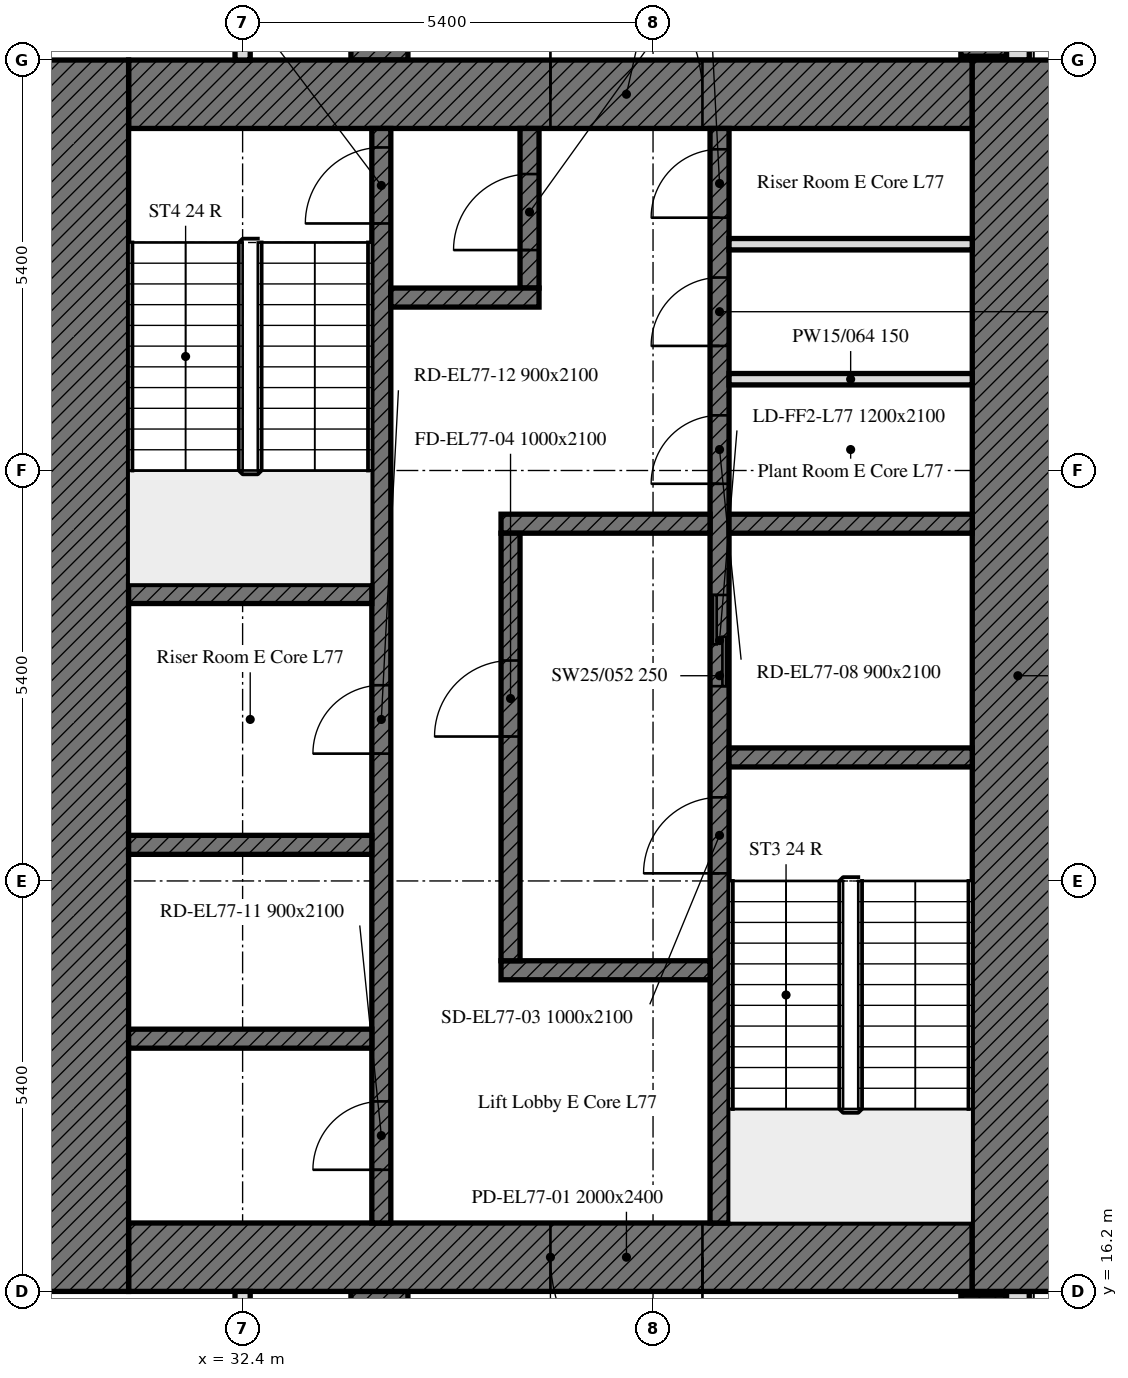
"""IFC4 building model, lengths in metres.
Left out: names, types, materials, properties, quantities, classifications, styles, units other than length and angle.
Written with IfcOpenShell. Run it as: python <this file> out.ifc"""

import sys

from ifc_helpers import new_model, si_unit, direction, frame, frame_2d, origin, place, context, subcontext, project, spatial, polyline, rectangle, outline, extrude, element, fill, save


model = new_model("IFC4")
c1 = context("Model", 3, precision=1e-05, world=origin(), true_north=direction((0.0, 1.0)))
c2 = subcontext(c1, "Body", "Model", "MODEL_VIEW")
j1 = project(units=[si_unit("LENGTHUNIT", "METRE"), si_unit("PLANEANGLEUNIT", "RADIAN")], contexts=[c1])
p1 = place(None, origin())
s1 = spatial("IfcSite", under=j1, at=p1, CompositionType="ELEMENT")
p2 = place(p1, origin())
s2 = spatial("IfcBuilding", under=s1, at=p2, CompositionType="ELEMENT")
p3 = place(p2, frame((0.0, 0.0, 308.2)))
s3 = spatial("IfcBuildingStorey", under=s2, at=p3, CompositionType="ELEMENT", Elevation=308.2)
p4 = place(p3, frame((42.15, 36.45, 0.0), z_axis=(0.0, 0.0, 1.0), x_axis=(0.0, -1.0, 0.0)))
e1 = element("IfcWall", 1, at=p4, inside=s3, PredefinedType="SHEAR", context=c2, shape_type="SweptSolid", body=[
    extrude(rectangle(XDim=4.0, YDim=0.6, at=frame_2d((2.0, 0.0))), origin(), (0.0, 0.0, 1.0), 4.2),
])
p5 = place(p3, frame((42.15, 16.15, 0.0), z_axis=(0.0, 0.0, 1.0), x_axis=(0.0, -1.0, 0.0)))
e2 = element("IfcWall", 2, at=p5, inside=s3, PredefinedType="SHEAR", context=c2, shape_type="SweptSolid", body=[
    extrude(rectangle(XDim=4.915, YDim=0.6, at=frame_2d((2.458, 0.0))), origin(), (0.0, 0.0, 1.0), 4.2),
])
p6 = place(p3, frame((34.2, 12.05, 0.0), z_axis=(0.0, 0.0, 1.0), x_axis=(0.0, 1.0, 0.0)))
e3 = element("IfcWall", 3, at=p6, inside=s3, PredefinedType="SHEAR", context=c2, shape_type="SweptSolid", body=[
    extrude(rectangle(XDim=4.15, YDim=0.75, at=frame_2d((2.075, 0.0))), origin(), (0.0, 0.0, 1.0), 4.2),
])
p7 = place(p3, frame((34.2, 32.4, 0.0), z_axis=(0.0, 0.0, 1.0), x_axis=(0.0, 1.0, 0.0)))
e4 = element("IfcWall", 4, at=p7, inside=s3, PredefinedType="SHEAR", context=c2, shape_type="SweptSolid", body=[
    extrude(rectangle(XDim=4.15, YDim=0.75, at=frame_2d((2.075, 0.0))), origin(), (0.0, 0.0, 1.0), 4.2),
])
p8 = place(p3, frame((42.6, 10.986, 0.0), z_axis=(0.0, 0.0, 1.0), x_axis=(0.0, 1.0, 0.0)))
e5 = element("IfcWall", 5, at=p8, inside=s3, PredefinedType="SOLIDWALL", context=c2, shape_type="SweptSolid", body=[
    extrude(outline(polyline([(0.0, 0.0), (5.214, 0.0), (5.214, 4.2), (4.634, 4.2), (4.055, 4.2), (3.476, 4.2), (2.896, 4.2), (2.317, 4.2), (1.738, 4.2), (1.159, 4.2), (0.579, 4.2), (0.0, 4.2), (0.0, 0.0)])), frame((0.0, 0.15, 0.0), z_axis=(0.0, -1.0, 0.0), x_axis=(1.0, 0.0, 0.0)), (0.0, 0.0, 1.0), 0.3),
])
p9 = place(p8, frame((1.014, 0.0, 0.6)))
e6 = element("IfcOpeningElement", 6, at=p9, cuts=e5, PredefinedType="OPENING", context=c2, shape_type="SweptSolid", body=[
    extrude(rectangle(XDim=3.0, YDim=1.8, at=frame_2d((1.5, 0.9))), frame((0.0, 0.16, 0.0), z_axis=(0.0, -1.0, 0.0), x_axis=(1.0, 0.0, 0.0)), (0.0, 0.0, 1.0), 0.32),
])
p10 = place(p3, frame((42.6, 32.4, 0.0), z_axis=(0.0, 0.0, 1.0), x_axis=(0.0, 1.0, 0.0)))
e7 = element("IfcWall", 7, at=p10, inside=s3, PredefinedType="SOLIDWALL", context=c2, shape_type="SweptSolid", body=[
    extrude(outline(polyline([(0.0, 0.0), (10.614, 0.0), (10.614, 4.2), (10.024, 4.2), (9.434, 4.2), (8.845, 4.2), (8.255, 4.2), (7.665, 4.2), (7.076, 4.2), (6.486, 4.2), (5.896, 4.2), (5.307, 4.2), (4.717, 4.2), (4.127, 4.2), (3.538, 4.2), (2.948, 4.2), (2.359, 4.2), (1.769, 4.2), (1.179, 4.2), (0.59, 4.2), (0.0, 4.2), (0.0, 0.0)])), frame((0.0, 0.15, 0.0), z_axis=(0.0, -1.0, 0.0), x_axis=(1.0, 0.0, 0.0)), (0.0, 0.0, 1.0), 0.3),
])
p11 = place(p10, frame((1.2, 0.0, 0.6)))
e8 = element("IfcOpeningElement", 8, at=p11, cuts=e7, PredefinedType="OPENING", context=c2, shape_type="SweptSolid", body=[
    extrude(rectangle(XDim=3.0, YDim=1.8, at=frame_2d((1.5, 0.9))), frame((0.0, 0.16, 0.0), z_axis=(0.0, -1.0, 0.0), x_axis=(1.0, 0.0, 0.0)), (0.0, 0.0, 1.0), 0.32),
])
p12 = place(p10, frame((6.6, 0.0, 0.6)))
e9 = element("IfcOpeningElement", 9, at=p12, cuts=e7, PredefinedType="OPENING", context=c2, shape_type="SweptSolid", body=[
    extrude(rectangle(XDim=3.0, YDim=1.8, at=frame_2d((1.5, 0.9))), frame((0.0, 0.16, 0.0), z_axis=(0.0, -1.0, 0.0), x_axis=(1.0, 0.0, 0.0)), (0.0, 0.0, 1.0), 0.32),
])
p13 = place(p3, frame((42.0, 16.65, 0.0), z_axis=(0.0, 0.0, 1.0), x_axis=(-1.0, 0.0, 0.0)))
e10 = element("IfcWall", 10, at=p13, inside=s3, PredefinedType="SOLIDWALL", context=c2, shape_type="SweptSolid", body=[
    extrude(rectangle(XDim=11.1, YDim=0.9, at=frame_2d((5.55, 0.0))), origin(), (0.0, 0.0, 1.0), 4.2),
])
p14 = place(p13, frame((3.55, 0.0, 0.0)))
e11 = element("IfcOpeningElement", 11, at=p14, cuts=e10, PredefinedType="OPENING", context=c2, shape_type="SweptSolid", body=[
    extrude(rectangle(XDim=2.0, YDim=2.4, at=frame_2d((1.0, 1.2))), frame((0.0, 0.45, 0.0), z_axis=(0.0, -1.0, 0.0), x_axis=(1.0, 0.0, 0.0)), (0.0, 0.0, 1.0), 0.9),
])
p15 = place(p3, frame((30.9, 31.95, 0.0), z_axis=(0.0, 0.0, 1.0), x_axis=(1.0, 0.0, 0.0)))
e12 = element("IfcWall", 12, at=p15, inside=s3, PredefinedType="SOLIDWALL", context=c2, shape_type="SweptSolid", body=[
    extrude(rectangle(XDim=11.1, YDim=0.9, at=frame_2d((5.55, 0.0))), origin(), (0.0, 0.0, 1.0), 4.2),
])
p16 = place(p15, frame((5.55, 0.0, 0.0)))
e13 = element("IfcOpeningElement", 13, at=p16, cuts=e12, PredefinedType="OPENING", context=c2, shape_type="SweptSolid", body=[
    extrude(rectangle(XDim=2.0, YDim=2.4, at=frame_2d((1.0, 1.2))), frame((0.0, 0.45, 0.0), z_axis=(0.0, -1.0, 0.0), x_axis=(1.0, 0.0, 0.0)), (0.0, 0.0, 1.0), 0.9),
])
for number, where, z_axis, x_axis in (
    (14, (42.6, 32.4, 0.0), (0.0, 0.0, 1.0), (0.0, -1.0, 0.0)),
    (15, (30.3, 16.2, 0.0), (0.0, 0.0, 1.0), (0.0, 1.0, 0.0)),
):
    element("IfcWall", number, at=place(p3, frame(where, z_axis=z_axis, x_axis=x_axis)), inside=s3, PredefinedType="SOLIDWALL", context=c2, shape_type="SweptSolid", body=[
        extrude(rectangle(XDim=16.2, YDim=1.2, at=frame_2d((8.1, 0.0))), origin(), (0.0, 0.0, 1.0), 4.2),
    ])
p17 = place(p3, frame((38.675, 17.1, 0.0), z_axis=(0.0, 0.0, 1.0), x_axis=(0.0, 1.0, 0.0)))
e16 = element("IfcWall", 16, at=p17, inside=s3, PredefinedType="SOLIDWALL", context=c2, shape_type="SweptSolid", body=[
    extrude(rectangle(XDim=14.4, YDim=0.25, at=frame_2d((7.2, 0.0))), origin(), (0.0, 0.0, 1.0), 4.2),
])
p18 = place(p17, frame((4.6, 0.0, 0.0)))
e17 = element("IfcOpeningElement", 17, at=p18, cuts=e16, PredefinedType="OPENING", context=c2, shape_type="SweptSolid", body=[
    extrude(rectangle(XDim=1.0, YDim=2.1, at=frame_2d((0.5, 1.05))), frame((0.0, 0.125, 0.0), z_axis=(0.0, -1.0, 0.0), x_axis=(1.0, 0.0, 0.0)), (0.0, 0.0, 1.0), 0.25),
])
p19 = place(p17, frame((7.062, 0.0, 0.0)))
e18 = element("IfcOpeningElement", 18, at=p19, cuts=e16, PredefinedType="OPENING", context=c2, shape_type="SweptSolid", body=[
    extrude(rectangle(XDim=1.2, YDim=2.1, at=frame_2d((0.6, 1.05))), frame((0.0, 0.125, 0.0), z_axis=(0.0, -1.0, 0.0), x_axis=(1.0, 0.0, 0.0)), (0.0, 0.0, 1.0), 0.25),
])
p20 = place(p17, frame((9.726, 0.0, 0.0)))
e19 = element("IfcOpeningElement", 19, at=p20, cuts=e16, PredefinedType="OPENING", context=c2, shape_type="SweptSolid", body=[
    extrude(rectangle(XDim=0.9, YDim=2.1, at=frame_2d((0.45, 1.05))), frame((0.0, 0.125, 0.0), z_axis=(0.0, -1.0, 0.0), x_axis=(1.0, 0.0, 0.0)), (0.0, 0.0, 1.0), 0.25),
])
p21 = place(p17, frame((11.539, 0.0, 0.0)))
e20 = element("IfcOpeningElement", 20, at=p21, cuts=e16, PredefinedType="OPENING", context=c2, shape_type="SweptSolid", body=[
    extrude(rectangle(XDim=0.9, YDim=2.1, at=frame_2d((0.45, 1.05))), frame((0.0, 0.125, 0.0), z_axis=(0.0, -1.0, 0.0), x_axis=(1.0, 0.0, 0.0)), (0.0, 0.0, 1.0), 0.25),
])
p22 = place(p17, frame((13.226, 0.0, 0.0)))
e21 = element("IfcOpeningElement", 21, at=p22, cuts=e16, PredefinedType="OPENING", context=c2, shape_type="SweptSolid", body=[
    extrude(rectangle(XDim=0.9, YDim=2.1, at=frame_2d((0.45, 1.05))), frame((0.0, 0.125, 0.0), z_axis=(0.0, -1.0, 0.0), x_axis=(1.0, 0.0, 0.0)), (0.0, 0.0, 1.0), 0.25),
])
p23 = place(p3, frame((34.225, 17.1, 0.0), z_axis=(0.0, 0.0, 1.0), x_axis=(0.0, 1.0, 0.0)))
e22 = element("IfcWall", 22, at=p23, inside=s3, PredefinedType="SOLIDWALL", context=c2, shape_type="SweptSolid", body=[
    extrude(rectangle(XDim=14.4, YDim=0.25, at=frame_2d((7.2, 0.0))), origin(), (0.0, 0.0, 1.0), 4.2),
])
p24 = place(p23, frame((13.15, 0.0, 0.0)))
e23 = element("IfcOpeningElement", 23, at=p24, cuts=e22, PredefinedType="OPENING", context=c2, shape_type="SweptSolid", body=[
    extrude(rectangle(XDim=1.0, YDim=2.1, at=frame_2d((0.5, 1.05))), frame((0.0, 0.125, 0.0), z_axis=(0.0, -1.0, 0.0), x_axis=(1.0, 0.0, 0.0)), (0.0, 0.0, 1.0), 0.25),
])
p25 = place(p23, frame((0.7, 0.0, 0.0)))
e24 = element("IfcOpeningElement", 24, at=p25, cuts=e22, PredefinedType="OPENING", context=c2, shape_type="SweptSolid", body=[
    extrude(rectangle(XDim=0.9, YDim=2.1, at=frame_2d((0.45, 1.05))), frame((0.0, 0.125, 0.0), z_axis=(0.0, -1.0, 0.0), x_axis=(1.0, 0.0, 0.0)), (0.0, 0.0, 1.0), 0.25),
])
p26 = place(p23, frame((6.175, 0.0, 0.0)))
e25 = element("IfcOpeningElement", 25, at=p26, cuts=e22, PredefinedType="OPENING", context=c2, shape_type="SweptSolid", body=[
    extrude(rectangle(XDim=0.9, YDim=2.1, at=frame_2d((0.45, 1.05))), frame((0.0, 0.125, 0.0), z_axis=(0.0, -1.0, 0.0), x_axis=(1.0, 0.0, 0.0)), (0.0, 0.0, 1.0), 0.25),
])
p27 = place(p3, frame((38.8, 23.225, 0.0), z_axis=(0.0, 0.0, 1.0), x_axis=(1.0, 0.0, 0.0)))
e26 = element("IfcWall", 26, at=p27, inside=s3, PredefinedType="SOLIDWALL", context=c2, shape_type="SweptSolid", body=[
    extrude(rectangle(XDim=3.2, YDim=0.25, at=frame_2d((1.6, 0.0))), origin(), (0.0, 0.0, 1.0), 4.2),
])
for number, where, z_axis, x_axis in (
    (27, (30.9, 25.375, 0.0), (0.0, 0.0, 1.0), (1.0, 0.0, 0.0)),
    (28, (30.9, 22.075, 0.0), (0.0, 0.0, 1.0), (1.0, 0.0, 0.0)),
):
    element("IfcWall", number, at=place(p3, frame(where, z_axis=z_axis, x_axis=x_axis)), inside=s3, PredefinedType="SOLIDWALL", context=c2, shape_type="SweptSolid", body=[
        extrude(rectangle(XDim=3.2, YDim=0.25, at=frame_2d((1.6, 0.0))), origin(), (0.0, 0.0, 1.0), 4.2),
    ])
p28 = place(p3, frame((38.8, 26.3, 0.0), z_axis=(0.0, 0.0, 1.0), x_axis=(1.0, 0.0, 0.0)))
e29 = element("IfcWall", 29, at=p28, inside=s3, PredefinedType="SOLIDWALL", context=c2, shape_type="SweptSolid", body=[
    extrude(rectangle(XDim=3.2, YDim=0.25, at=frame_2d((1.6, 0.0))), origin(), (0.0, 0.0, 1.0), 4.2),
])
for number, where, z_axis, x_axis in (
    (30, (35.8, 26.3, 0.0), (0.0, 0.0, 1.0), (1.0, 0.0, 0.0)),
    (31, (35.8, 20.425, 0.0), (0.0, 0.0, 1.0), (1.0, 0.0, 0.0)),
):
    element("IfcWall", number, at=place(p3, frame(where, z_axis=z_axis, x_axis=x_axis)), inside=s3, PredefinedType="SOLIDWALL", context=c2, shape_type="SweptSolid", body=[
        extrude(rectangle(XDim=2.75, YDim=0.25, at=frame_2d((1.375, 0.0))), origin(), (0.0, 0.0, 1.0), 4.2),
    ])
p29 = place(p3, frame((36.175, 29.4, 0.0), z_axis=(0.0, 0.0, 1.0), x_axis=(0.0, 1.0, 0.0)))
e32 = element("IfcWall", 32, at=p29, inside=s3, PredefinedType="SOLIDWALL", context=c2, shape_type="SweptSolid", body=[
    extrude(rectangle(XDim=2.1, YDim=0.25, at=frame_2d((1.05, 0.0))), origin(), (0.0, 0.0, 1.0), 4.2),
])
p30 = place(p29, frame((0.5, 0.0, 0.0)))
e33 = element("IfcOpeningElement", 33, at=p30, cuts=e32, PredefinedType="OPENING", context=c2, shape_type="SweptSolid", body=[
    extrude(rectangle(XDim=1.0, YDim=2.1, at=frame_2d((0.5, 1.05))), frame((0.0, 0.125, 0.0), z_axis=(0.0, -1.0, 0.0), x_axis=(1.0, 0.0, 0.0)), (0.0, 0.0, 1.0), 0.25),
])
p31 = place(p3, frame((34.35, 29.275, 0.0), z_axis=(0.0, 0.0, 1.0), x_axis=(1.0, 0.0, 0.0)))
e34 = element("IfcWall", 34, at=p31, inside=s3, PredefinedType="SOLIDWALL", context=c2, shape_type="SweptSolid", body=[
    extrude(rectangle(XDim=1.95, YDim=0.25, at=frame_2d((0.975, 0.0))), origin(), (0.0, 0.0, 1.0), 4.2),
])
p32 = place(p3, frame((35.925, 20.55, 0.0), z_axis=(0.0, 0.0, 1.0), x_axis=(0.0, 1.0, 0.0)))
e35 = element("IfcWall", 35, at=p32, inside=s3, PredefinedType="SOLIDWALL", context=c2, shape_type="SweptSolid", body=[
    extrude(rectangle(XDim=5.625, YDim=0.25, at=frame_2d((2.812, 0.0))), origin(), (0.0, 0.0, 1.0), 4.2),
])
p33 = place(p32, frame((2.95, 0.0, 0.0)))
e36 = element("IfcOpeningElement", 36, at=p33, cuts=e35, PredefinedType="OPENING", context=c2, shape_type="SweptSolid", body=[
    extrude(rectangle(XDim=1.0, YDim=2.1, at=frame_2d((0.5, 1.05))), frame((0.0, 0.125, 0.0), z_axis=(0.0, -1.0, 0.0), x_axis=(1.0, 0.0, 0.0)), (0.0, 0.0, 1.0), 0.25),
])
p34 = place(p3, frame((30.9, 19.525, 0.0), z_axis=(0.0, 0.0, 1.0), x_axis=(1.0, 0.0, 0.0)))
e37 = element("IfcWall", 37, at=p34, inside=s3, PredefinedType="SOLIDWALL", context=c2, shape_type="SweptSolid", body=[
    extrude(rectangle(XDim=3.2, YDim=0.25, at=frame_2d((1.6, 0.0))), origin(), (0.0, 0.0, 1.0), 4.2),
])
for number, where, z_axis, x_axis in (
    (38, (38.8, 28.201, 0.0), (0.0, 0.0, 1.0), (1.0, 0.0, 0.0)),
    (39, (38.8, 29.977, 0.0), (0.0, 0.0, 1.0), (1.0, 0.0, 0.0)),
):
    element("IfcWall", number, at=place(p3, frame(where, z_axis=z_axis, x_axis=x_axis)), inside=s3, PredefinedType="PARTITIONING", context=c2, shape_type="SweptSolid", body=[
        extrude(rectangle(XDim=3.2, YDim=0.15, at=frame_2d((1.6, 0.0))), origin(), (0.0, 0.0, 1.0), 4.2),
    ])
p35 = place(p3, frame((32.4, 32.4, 0.0), z_axis=(0.0, 0.0, 1.0), x_axis=(0.0, 1.0, 0.0)))
e40 = element("IfcWall", 40, at=p35, inside=s3, PredefinedType="PARTITIONING", context=c2, shape_type="SweptSolid", body=[
    extrude(rectangle(XDim=3.6, YDim=0.2, at=frame_2d((1.8, 0.0))), origin(), (0.0, 0.0, 1.0), 3.45),
])
p36 = place(p3, frame((32.4, 12.55, 0.0), z_axis=(0.0, 0.0, 1.0), x_axis=(0.0, 1.0, 0.0)))
e41 = element("IfcWall", 41, at=p36, inside=s3, PredefinedType="PARTITIONING", context=c2, shape_type="SweptSolid", body=[
    extrude(rectangle(XDim=3.65, YDim=0.2, at=frame_2d((1.825, 0.0))), origin(), (0.0, 0.0, 1.0), 4.2),
])
p37 = place(p14, origin())
e42 = element("IfcDoor", 42, at=p37, inside=s3, OperationType="DOUBLE_DOOR_SINGLE_SWING", PredefinedType="DOOR", context=c2, shape_type="SweptSolid", body=[
    extrude(rectangle(XDim=2.0, YDim=2.4, at=frame_2d((1.0, 1.2))), frame((0.0, 0.025, 0.0), z_axis=(0.0, -1.0, 0.0), x_axis=(1.0, 0.0, 0.0)), (0.0, 0.0, 1.0), 0.05),
])
fill(e11, e42)
p38 = place(p16, origin())
e43 = element("IfcDoor", 43, at=p38, inside=s3, OperationType="DOUBLE_DOOR_SINGLE_SWING", PredefinedType="DOOR", context=c2, shape_type="SweptSolid", body=[
    extrude(rectangle(XDim=2.0, YDim=2.4, at=frame_2d((1.0, 1.2))), frame((0.0, 0.025, 0.0), z_axis=(0.0, -1.0, 0.0), x_axis=(1.0, 0.0, 0.0)), (0.0, 0.0, 1.0), 0.05),
])
fill(e13, e43)
p39 = place(p18, origin())
e44 = element("IfcDoor", 44, at=p39, inside=s3, OperationType="SINGLE_SWING_LEFT", PredefinedType="DOOR", context=c2, shape_type="SweptSolid", body=[
    extrude(rectangle(XDim=1.0, YDim=2.1, at=frame_2d((0.5, 1.05))), frame((0.0, 0.025, 0.0), z_axis=(0.0, -1.0, 0.0), x_axis=(1.0, 0.0, 0.0)), (0.0, 0.0, 1.0), 0.05),
])
fill(e17, e44)
p40 = place(p33, origin())
e45 = element("IfcDoor", 45, at=p40, inside=s3, OperationType="SINGLE_SWING_LEFT", PredefinedType="DOOR", context=c2, shape_type="SweptSolid", body=[
    extrude(rectangle(XDim=1.0, YDim=2.1, at=frame_2d((0.5, 1.05))), frame((0.0, 0.025, 0.0), z_axis=(0.0, -1.0, 0.0), x_axis=(1.0, 0.0, 0.0)), (0.0, 0.0, 1.0), 0.05),
])
fill(e36, e45)
p41 = place(p24, origin())
e46 = element("IfcDoor", 46, at=p41, inside=s3, OperationType="SINGLE_SWING_LEFT", PredefinedType="DOOR", context=c2, shape_type="SweptSolid", body=[
    extrude(rectangle(XDim=1.0, YDim=2.1, at=frame_2d((0.5, 1.05))), frame((0.0, 0.025, 0.0), z_axis=(0.0, -1.0, 0.0), x_axis=(1.0, 0.0, 0.0)), (0.0, 0.0, 1.0), 0.05),
])
fill(e23, e46)
p42 = place(p30, origin())
e47 = element("IfcDoor", 47, at=p42, inside=s3, OperationType="SINGLE_SWING_LEFT", PredefinedType="DOOR", context=c2, shape_type="SweptSolid", body=[
    extrude(rectangle(XDim=1.0, YDim=2.1, at=frame_2d((0.5, 1.05))), frame((0.0, 0.025, 0.0), z_axis=(0.0, -1.0, 0.0), x_axis=(1.0, 0.0, 0.0)), (0.0, 0.0, 1.0), 0.05),
])
fill(e33, e47)
p43 = place(p19, origin())
e48 = element("IfcDoor", 48, at=p43, inside=s3, OperationType="DOUBLE_DOOR_SLIDING", PredefinedType="DOOR", context=c2, shape_type="SweptSolid", body=[
    extrude(rectangle(XDim=1.2, YDim=2.1, at=frame_2d((0.6, 1.05))), frame((0.0, 0.025, 0.0), z_axis=(0.0, -1.0, 0.0), x_axis=(1.0, 0.0, 0.0)), (0.0, 0.0, 1.0), 0.05),
])
fill(e18, e48)
p44 = place(p20, origin())
e49 = element("IfcDoor", 49, at=p44, inside=s3, OperationType="SINGLE_SWING_LEFT", PredefinedType="DOOR", context=c2, shape_type="SweptSolid", body=[
    extrude(rectangle(XDim=0.9, YDim=2.1, at=frame_2d((0.45, 1.05))), frame((0.0, 0.025, 0.0), z_axis=(0.0, -1.0, 0.0), x_axis=(1.0, 0.0, 0.0)), (0.0, 0.0, 1.0), 0.05),
])
fill(e19, e49)
p45 = place(p21, origin())
e50 = element("IfcDoor", 50, at=p45, inside=s3, OperationType="SINGLE_SWING_LEFT", PredefinedType="DOOR", context=c2, shape_type="SweptSolid", body=[
    extrude(rectangle(XDim=0.9, YDim=2.1, at=frame_2d((0.45, 1.05))), frame((0.0, 0.025, 0.0), z_axis=(0.0, -1.0, 0.0), x_axis=(1.0, 0.0, 0.0)), (0.0, 0.0, 1.0), 0.05),
])
fill(e20, e50)
p46 = place(p22, origin())
e51 = element("IfcDoor", 51, at=p46, inside=s3, OperationType="SINGLE_SWING_LEFT", PredefinedType="DOOR", context=c2, shape_type="SweptSolid", body=[
    extrude(rectangle(XDim=0.9, YDim=2.1, at=frame_2d((0.45, 1.05))), frame((0.0, 0.025, 0.0), z_axis=(0.0, -1.0, 0.0), x_axis=(1.0, 0.0, 0.0)), (0.0, 0.0, 1.0), 0.05),
])
fill(e21, e51)
p47 = place(p25, origin())
e52 = element("IfcDoor", 52, at=p47, inside=s3, OperationType="SINGLE_SWING_LEFT", PredefinedType="DOOR", context=c2, shape_type="SweptSolid", body=[
    extrude(rectangle(XDim=0.9, YDim=2.1, at=frame_2d((0.45, 1.05))), frame((0.0, 0.025, 0.0), z_axis=(0.0, -1.0, 0.0), x_axis=(1.0, 0.0, 0.0)), (0.0, 0.0, 1.0), 0.05),
])
fill(e24, e52)
p48 = place(p26, origin())
e53 = element("IfcDoor", 53, at=p48, inside=s3, OperationType="SINGLE_SWING_LEFT", PredefinedType="DOOR", context=c2, shape_type="SweptSolid", body=[
    extrude(rectangle(XDim=0.9, YDim=2.1, at=frame_2d((0.45, 1.05))), frame((0.0, 0.025, 0.0), z_axis=(0.0, -1.0, 0.0), x_axis=(1.0, 0.0, 0.0)), (0.0, 0.0, 1.0), 0.05),
])
fill(e25, e53)
save(model, sys.argv[1])
